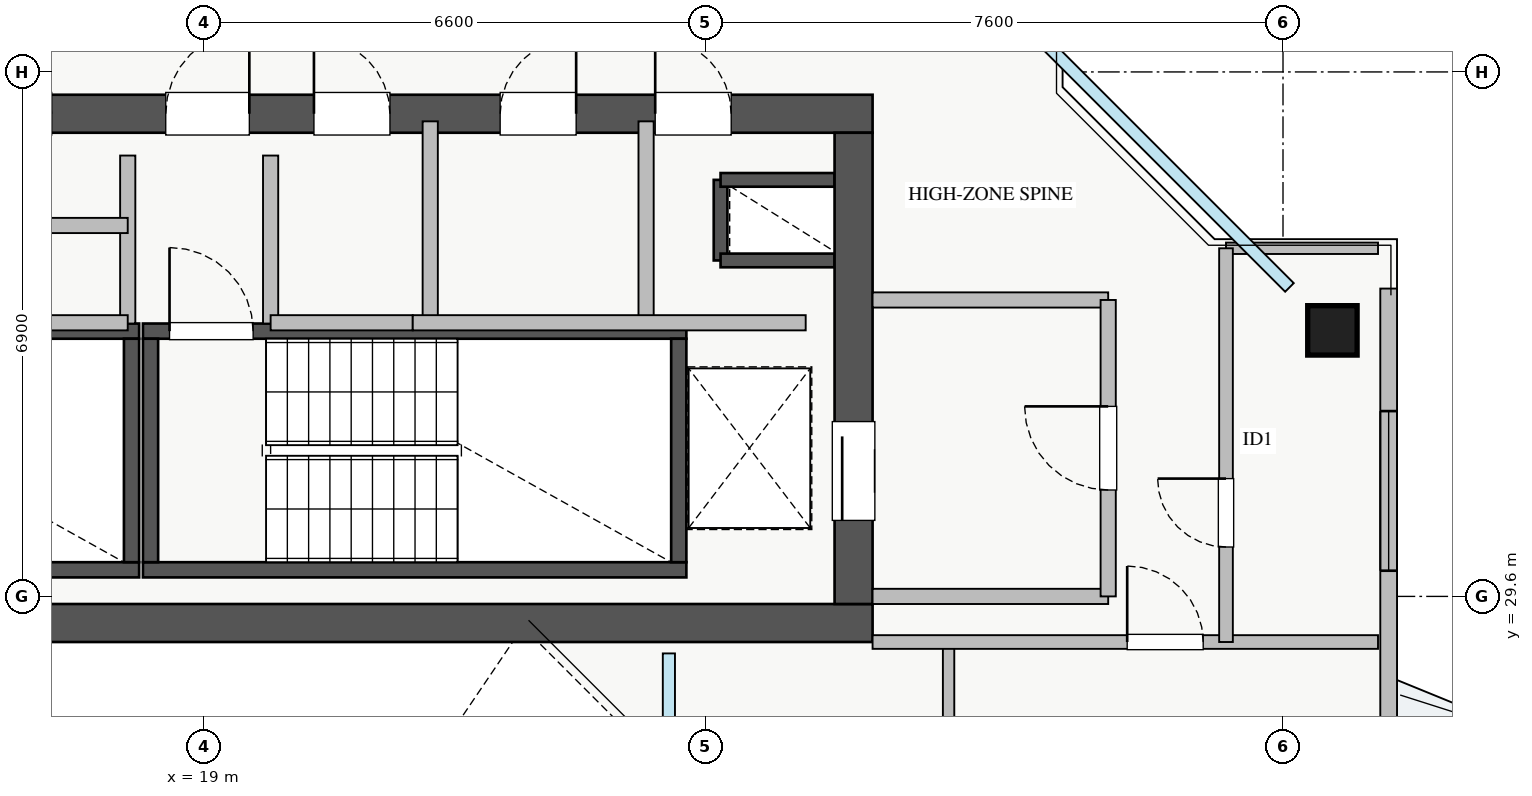
"""IFC4 building model, lengths in metres.
Left out: names, types, materials, properties, quantities, classifications, styles, units other than length and angle.
Written with IfcOpenShell. Run it as: python <this file> out.ifc"""

import sys

from ifc_helpers import new_model, si_unit, direction, frame, frame_2d, origin, origin_2d, place, context, subcontext, project, spatial, rectangle, extrude, source, transform, mapped, element, fill, save


model = new_model("IFC4")
c1 = context("Model", 3, precision=1e-05, world=origin(), true_north=direction((0.0, 1.0)))
c2 = subcontext(c1, "Body", "Model", "MODEL_VIEW")
j1 = project(units=[si_unit("LENGTHUNIT", "METRE"), si_unit("PLANEANGLEUNIT", "RADIAN")], contexts=[c1])
p1 = place(None, origin())
s1 = spatial("IfcSite", under=j1, at=p1, CompositionType="ELEMENT")
p2 = place(p1, origin())
s2 = spatial("IfcBuilding", under=s1, at=p2, CompositionType="ELEMENT")
p3 = place(p2, frame((0.0, 0.0, 240.5)))
s3 = spatial("IfcBuildingStorey", under=s2, at=p3, CompositionType="ELEMENT", Elevation=240.5)
p4 = place(p3, frame((25.8, 34.02, 0.0), z_axis=(0.0, 0.0, 1.0), x_axis=(0.0, 1.0, 0.0)))
e1 = element("IfcWall", 1, at=p4, inside=s3, PredefinedType="SHEAR", context=c2, shape_type="SweptSolid", body=[
    extrude(rectangle(XDim=1.06, YDim=0.18, at=frame_2d((0.53, 0.0))), origin(), (0.0, 0.0, 1.0), 3.07),
])
for number, where, z_axis, x_axis in (
    (2, (25.8, 35.08, 0.0), (0.0, 0.0, 1.0), (1.0, 0.0, 0.0)),
    (3, (25.8, 34.02, 0.0), (0.0, 0.0, 1.0), (1.0, 0.0, 0.0)),
):
    element("IfcWall", number, at=place(p3, frame(where, z_axis=z_axis, x_axis=x_axis)), inside=s3, PredefinedType="SHEAR", context=c2, shape_type="SweptSolid", body=[
        extrude(rectangle(XDim=1.5, YDim=0.18, at=frame_2d((0.75, 0.0))), origin(), (0.0, 0.0, 1.0), 3.07),
    ])
p5 = place(p3, frame((10.7, 29.95, 0.0), z_axis=(0.0, 0.0, 1.0), x_axis=(1.0, 0.0, 0.0)))
e4 = element("IfcWall", 4, at=p5, inside=s3, PredefinedType="SHEAR", context=c2, shape_type="SweptSolid", body=[
    extrude(rectangle(XDim=7.45, YDim=0.2, at=frame_2d((3.725, 0.0))), origin(), (0.0, 0.0, 1.0), 3.25),
])
p6 = place(p3, frame((10.7, 33.09, 0.0), z_axis=(0.0, 0.0, 1.0), x_axis=(1.0, 0.0, 0.0)))
e5 = element("IfcWall", 5, at=p6, inside=s3, PredefinedType="SHEAR", context=c2, shape_type="SweptSolid", body=[
    extrude(rectangle(XDim=7.45, YDim=0.2, at=frame_2d((3.725, 0.0))), origin(), (0.0, 0.0, 1.0), 3.25),
])
p7 = place(p6, frame((0.35, 0.0, 0.0)))
e6 = element("IfcOpeningElement", 6, at=p7, cuts=e5, PredefinedType="OPENING", context=c2, shape_type="SweptSolid", body=[
    extrude(rectangle(XDim=1.1, YDim=2.05, at=frame_2d((0.55, 1.025))), frame((0.0, 0.11, 0.0), z_axis=(0.0, -1.0, 0.0), x_axis=(1.0, 0.0, 0.0)), (0.0, 0.0, 1.0), 0.22),
])
p8 = place(p3, frame((18.05, 30.05, 0.0), z_axis=(0.0, 0.0, 1.0), x_axis=(0.0, 1.0, 0.0)))
e7 = element("IfcWall", 7, at=p8, inside=s3, PredefinedType="SHEAR", context=c2, shape_type="SweptSolid", body=[
    extrude(rectangle(XDim=2.94, YDim=0.2, at=frame_2d((1.47, 0.0))), origin(), (0.0, 0.0, 1.0), 3.25),
])
p9 = place(p3, frame((18.2, 29.95, 0.0), z_axis=(0.0, 0.0, 1.0), x_axis=(1.0, 0.0, 0.0)))
e8 = element("IfcWall", 8, at=p9, inside=s3, PredefinedType="SHEAR", context=c2, shape_type="SweptSolid", body=[
    extrude(rectangle(XDim=7.15, YDim=0.2, at=frame_2d((3.575, 0.0))), origin(), (0.0, 0.0, 1.0), 3.25),
])
p10 = place(p3, frame((18.2, 33.09, 0.0), z_axis=(0.0, 0.0, 1.0), x_axis=(1.0, 0.0, 0.0)))
e9 = element("IfcWall", 9, at=p10, inside=s3, PredefinedType="SHEAR", context=c2, shape_type="SweptSolid", body=[
    extrude(rectangle(XDim=7.15, YDim=0.2, at=frame_2d((3.575, 0.0))), origin(), (0.0, 0.0, 1.0), 3.25),
])
p11 = place(p10, frame((0.35, 0.0, 0.0)))
e10 = element("IfcOpeningElement", 10, at=p11, cuts=e9, PredefinedType="OPENING", context=c2, shape_type="SweptSolid", body=[
    extrude(rectangle(XDim=1.1, YDim=2.05, at=frame_2d((0.55, 1.025))), frame((0.0, 0.11, 0.0), z_axis=(0.0, -1.0, 0.0), x_axis=(1.0, 0.0, 0.0)), (0.0, 0.0, 1.0), 0.22),
])
for number, where, z_axis, x_axis in (
    (11, (18.3, 30.05, 0.0), (0.0, 0.0, 1.0), (0.0, 1.0, 0.0)),
    (12, (25.25, 30.05, 0.0), (0.0, 0.0, 1.0), (0.0, 1.0, 0.0)),
):
    element("IfcWall", number, at=place(p3, frame(where, z_axis=z_axis, x_axis=x_axis)), inside=s3, PredefinedType="SHEAR", context=c2, shape_type="SweptSolid", body=[
        extrude(rectangle(XDim=2.94, YDim=0.2, at=frame_2d((1.47, 0.0))), origin(), (0.0, 0.0, 1.0), 3.25),
    ])
p12 = place(p3, frame((10.2, 29.25, 0.0), z_axis=(0.0, 0.0, 1.0), x_axis=(1.0, 0.0, 0.0)))
e13 = element("IfcWall", 13, at=p12, inside=s3, PredefinedType="SHEAR", context=c2, shape_type="SweptSolid", body=[
    extrude(rectangle(XDim=17.6, YDim=0.5, at=frame_2d((8.8, 0.0))), origin(), (0.0, 0.0, 1.0), 3.25),
])
p13 = place(p3, frame((10.2, 35.95, 0.0), z_axis=(0.0, 0.0, 1.0), x_axis=(1.0, 0.0, 0.0)))
e14 = element("IfcWall", 14, at=p13, inside=s3, PredefinedType="SHEAR", context=c2, shape_type="SweptSolid", body=[
    extrude(rectangle(XDim=17.6, YDim=0.5, at=frame_2d((8.8, 0.0))), origin(), (0.0, 0.0, 1.0), 3.25),
])
p14 = place(p13, frame((1.15, 0.0, 0.0)))
e15 = element("IfcOpeningElement", 15, at=p14, cuts=e14, PredefinedType="OPENING", context=c2, shape_type="SweptSolid", body=[
    extrude(rectangle(XDim=1.1, YDim=2.05, at=frame_2d((0.55, 1.025))), frame((0.0, 0.26, 0.0), z_axis=(0.0, -1.0, 0.0), x_axis=(1.0, 0.0, 0.0)), (0.0, 0.0, 1.0), 0.52),
])
p15 = place(p13, frame((8.3, 0.0, 0.0)))
e16 = element("IfcOpeningElement", 16, at=p15, cuts=e14, PredefinedType="OPENING", context=c2, shape_type="SweptSolid", body=[
    extrude(rectangle(XDim=1.1, YDim=2.05, at=frame_2d((0.55, 1.025))), frame((0.0, 0.26, 0.0), z_axis=(0.0, -1.0, 0.0), x_axis=(1.0, 0.0, 0.0)), (0.0, 0.0, 1.0), 0.52),
])
p16 = place(p13, frame((2.85, 0.0, 0.0)))
e17 = element("IfcOpeningElement", 17, at=p16, cuts=e14, PredefinedType="OPENING", context=c2, shape_type="SweptSolid", body=[
    extrude(rectangle(XDim=1.1, YDim=2.05, at=frame_2d((0.55, 1.025))), frame((0.0, 0.26, 0.0), z_axis=(0.0, -1.0, 0.0), x_axis=(1.0, 0.0, 0.0)), (0.0, 0.0, 1.0), 0.52),
])
p17 = place(p13, frame((5.8, 0.0, 0.0)))
e18 = element("IfcOpeningElement", 18, at=p17, cuts=e14, PredefinedType="OPENING", context=c2, shape_type="SweptSolid", body=[
    extrude(rectangle(XDim=1.0, YDim=2.05, at=frame_2d((0.5, 1.025))), frame((0.0, 0.26, 0.0), z_axis=(0.0, -1.0, 0.0), x_axis=(1.0, 0.0, 0.0)), (0.0, 0.0, 1.0), 0.52),
])
p18 = place(p13, frame((14.74, 0.0, 0.0)))
e19 = element("IfcOpeningElement", 19, at=p18, cuts=e14, PredefinedType="OPENING", context=c2, shape_type="SweptSolid", body=[
    extrude(rectangle(XDim=1.0, YDim=2.05, at=frame_2d((0.5, 1.025))), frame((0.0, 0.26, 0.0), z_axis=(0.0, -1.0, 0.0), x_axis=(1.0, 0.0, 0.0)), (0.0, 0.0, 1.0), 0.52),
])
p19 = place(p13, frame((10.25, 0.0, 0.0)))
e20 = element("IfcOpeningElement", 20, at=p19, cuts=e14, PredefinedType="OPENING", context=c2, shape_type="SweptSolid", body=[
    extrude(rectangle(XDim=1.0, YDim=2.05, at=frame_2d((0.5, 1.025))), frame((0.0, 0.26, 0.0), z_axis=(0.0, -1.0, 0.0), x_axis=(1.0, 0.0, 0.0)), (0.0, 0.0, 1.0), 0.52),
])
p20 = place(p13, frame((12.7, 0.0, 0.0)))
e21 = element("IfcOpeningElement", 21, at=p20, cuts=e14, PredefinedType="OPENING", context=c2, shape_type="SweptSolid", body=[
    extrude(rectangle(XDim=1.0, YDim=2.05, at=frame_2d((0.5, 1.025))), frame((0.0, 0.26, 0.0), z_axis=(0.0, -1.0, 0.0), x_axis=(1.0, 0.0, 0.0)), (0.0, 0.0, 1.0), 0.52),
])
p21 = place(p3, frame((27.55, 29.5, 0.0), z_axis=(0.0, 0.0, 1.0), x_axis=(0.0, 1.0, 0.0)))
e22 = element("IfcWall", 22, at=p21, inside=s3, PredefinedType="SHEAR", context=c2, shape_type="SweptSolid", body=[
    extrude(rectangle(XDim=6.2, YDim=0.5, at=frame_2d((3.1, 0.0))), origin(), (0.0, 0.0, 1.0), 3.25),
])
p22 = place(p21, frame((1.1, 0.0, 0.0)))
e23 = element("IfcOpeningElement", 23, at=p22, cuts=e22, PredefinedType="OPENING", context=c2, shape_type="SweptSolid", body=[
    extrude(rectangle(XDim=1.3, YDim=2.05, at=frame_2d((0.65, 1.025))), frame((0.0, 0.26, 0.0), z_axis=(0.0, -1.0, 0.0), x_axis=(1.0, 0.0, 0.0)), (0.0, 0.0, 1.0), 0.52),
])
m1 = source(origin(), c2, "Body", "SweptSolid", [
    extrude(rectangle(XDim=0.65, YDim=0.65, at=origin_2d()), origin(), (0.0, 0.0, 1.0), 3.25),
])
p23 = place(p3, frame((33.85, 33.1, 0.0), z_axis=(0.0, 0.0, 1.0), x_axis=(1.0, 0.0, 0.0)))
e24 = element("IfcColumn", 24, at=p23, inside=s3, PredefinedType="COLUMN", context=c2, shape_type="MappedRepresentation", body=[
    mapped(m1, transform((0.0, 0.0, 0.0), x_axis=(1.0, 0.0, 0.0), y_axis=(0.0, 1.0, 0.0), z_axis=(0.0, 0.0, 1.0), scale=1.0)),
])
p24 = place(p3, frame((34.59, 12.35, 0.0), z_axis=(0.0, 0.0, 1.0), x_axis=(0.0, 1.0, 0.0)))
e25 = element("IfcWall", 25, at=p24, inside=s3, PredefinedType="STANDARD", context=c2, shape_type="SweptSolid", body=[
    extrude(rectangle(XDim=21.3, YDim=0.22, at=frame_2d((10.65, 0.0))), origin(), (0.0, 0.0, 1.0), 2.61),
])
p25 = place(p24, frame((11.5, 0.0, 0.0)))
e26 = element("IfcOpeningElement", 26, at=p25, cuts=e25, PredefinedType="OPENING", context=c2, shape_type="SweptSolid", body=[
    extrude(rectangle(XDim=1.2, YDim=2.1, at=frame_2d((0.6, 1.05))), frame((0.0, 0.12, 0.0), z_axis=(0.0, -1.0, 0.0), x_axis=(1.0, 0.0, 0.0)), (0.0, 0.0, 1.0), 0.24),
])
p26 = place(p24, frame((1.463, 0.0, 0.9)))
e27 = element("IfcOpeningElement", 27, at=p26, cuts=e25, PredefinedType="OPENING", context=c2, shape_type="SweptSolid", body=[
    extrude(rectangle(XDim=2.4, YDim=1.48, at=frame_2d((1.2, 0.74))), frame((0.0, 0.12, 0.0), z_axis=(0.0, -1.0, 0.0), x_axis=(1.0, 0.0, 0.0)), (0.0, 0.0, 1.0), 0.24),
])
p27 = place(p24, frame((17.588, 0.0, 0.9)))
e28 = element("IfcOpeningElement", 28, at=p27, cuts=e25, PredefinedType="OPENING", context=c2, shape_type="SweptSolid", body=[
    extrude(rectangle(XDim=2.1, YDim=1.48, at=frame_2d((1.05, 0.74))), frame((0.0, 0.12, 0.0), z_axis=(0.0, -1.0, 0.0), x_axis=(1.0, 0.0, 0.0)), (0.0, 0.0, 1.0), 0.24),
])
for number, where, z_axis, x_axis in (
    (29, (27.8, 29.6, 0.0), (0.0, 0.0, 1.0), (1.0, 0.0, 0.0)),
    (30, (27.8, 33.5, 0.0), (0.0, 0.0, 1.0), (1.0, 0.0, 0.0)),
):
    element("IfcWall", number, at=place(p3, frame(where, z_axis=z_axis, x_axis=x_axis)), inside=s3, PredefinedType="PARTITIONING", context=c2, shape_type="SweptSolid", body=[
        extrude(rectangle(XDim=3.1, YDim=0.2, at=frame_2d((1.55, 0.0))), origin(), (0.0, 0.0, 1.0), 3.07),
    ])
p28 = place(p3, frame((30.9, 29.6, 0.0), z_axis=(0.0, 0.0, 1.0), x_axis=(0.0, 1.0, 0.0)))
e31 = element("IfcWall", 31, at=p28, inside=s3, PredefinedType="PARTITIONING", context=c2, shape_type="SweptSolid", body=[
    extrude(rectangle(XDim=3.9, YDim=0.2, at=frame_2d((1.95, 0.0))), origin(), (0.0, 0.0, 1.0), 2.821),
])
p29 = place(p28, frame((1.4, 0.0, 0.0)))
e32 = element("IfcOpeningElement", 32, at=p29, cuts=e31, PredefinedType="OPENING", context=c2, shape_type="SweptSolid", body=[
    extrude(rectangle(XDim=1.1, YDim=2.05, at=frame_2d((0.55, 1.025))), frame((0.0, 0.11, 0.0), z_axis=(0.0, -1.0, 0.0), x_axis=(1.0, 0.0, 0.0)), (0.0, 0.0, 1.0), 0.22),
])
for number, where, z_axis, x_axis in (
    (33, (18.0, 33.19, 0.0), (0.0, 0.0, 1.0), (0.0, 1.0, 0.0)),
    (34, (19.88, 33.19, 0.0), (0.0, 0.0, 1.0), (0.0, 1.0, 0.0)),
):
    element("IfcWall", number, at=place(p3, frame(where, z_axis=z_axis, x_axis=x_axis)), inside=s3, PredefinedType="PARTITIONING", context=c2, shape_type="SweptSolid", body=[
        extrude(rectangle(XDim=2.21, YDim=0.2, at=frame_2d((1.105, 0.0))), origin(), (0.0, 0.0, 1.0), 3.07),
    ])
p30 = place(p3, frame((14.72, 34.48, 0.0), z_axis=(0.0, 0.0, 1.0), x_axis=(1.0, 0.0, 0.0)))
e35 = element("IfcWall", 35, at=p30, inside=s3, PredefinedType="PARTITIONING", context=c2, shape_type="SweptSolid", body=[
    extrude(rectangle(XDim=3.28, YDim=0.2, at=frame_2d((1.64, 0.0))), origin(), (0.0, 0.0, 1.0), 3.07),
])
p31 = place(p30, frame((1.15, 0.0, 0.0)))
e36 = element("IfcOpeningElement", 36, at=p31, cuts=e35, PredefinedType="OPENING", context=c2, shape_type="SweptSolid", body=[
    extrude(rectangle(XDim=0.9, YDim=2.05, at=frame_2d((0.45, 1.025))), frame((0.0, 0.11, 0.0), z_axis=(0.0, -1.0, 0.0), x_axis=(1.0, 0.0, 0.0)), (0.0, 0.0, 1.0), 0.22),
])
p32 = place(p3, frame((14.72, 33.2, 0.0), z_axis=(0.0, 0.0, 1.0), x_axis=(1.0, 0.0, 0.0)))
e37 = element("IfcWall", 37, at=p32, inside=s3, PredefinedType="PARTITIONING", context=c2, shape_type="SweptSolid", body=[
    extrude(rectangle(XDim=3.28, YDim=0.2, at=frame_2d((1.64, 0.0))), origin(), (0.0, 0.0, 1.0), 3.07),
])
p33 = place(p3, frame((24.82, 33.2, 0.0), z_axis=(0.0, 0.0, 1.0), x_axis=(0.0, 1.0, 0.0)))
e38 = element("IfcWall", 38, at=p33, inside=s3, PredefinedType="PARTITIONING", context=c2, shape_type="SweptSolid", body=[
    extrude(rectangle(XDim=2.65, YDim=0.2, at=frame_2d((1.325, 0.0))), origin(), (0.0, 0.0, 1.0), 3.07),
])
p34 = place(p3, frame((19.88, 33.2, 0.0), z_axis=(0.0, 0.0, 1.0), x_axis=(1.0, 0.0, 0.0)))
e39 = element("IfcWall", 39, at=p34, inside=s3, PredefinedType="PARTITIONING", context=c2, shape_type="SweptSolid", body=[
    extrude(rectangle(XDim=1.87, YDim=0.2, at=frame_2d((0.935, 0.0))), origin(), (0.0, 0.0, 1.0), 3.07),
])
p35 = place(p3, frame((21.98, 33.2, 0.0), z_axis=(0.0, 0.0, 1.0), x_axis=(0.0, 1.0, 0.0)))
e40 = element("IfcWall", 40, at=p35, inside=s3, PredefinedType="PARTITIONING", context=c2, shape_type="SweptSolid", body=[
    extrude(rectangle(XDim=2.65, YDim=0.2, at=frame_2d((1.325, 0.0))), origin(), (0.0, 0.0, 1.0), 3.07),
])
p36 = place(p3, frame((21.75, 33.2, 0.0), z_axis=(0.0, 0.0, 1.0), x_axis=(1.0, 0.0, 0.0)))
e41 = element("IfcWall", 41, at=p36, inside=s3, PredefinedType="PARTITIONING", context=c2, shape_type="SweptSolid", body=[
    extrude(rectangle(XDim=5.17, YDim=0.2, at=frame_2d((2.585, 0.0))), origin(), (0.0, 0.0, 1.0), 3.07),
])
p37 = place(p3, frame((28.8, 23.0, 0.0), z_axis=(0.0, 0.0, 1.0), x_axis=(0.0, 1.0, 0.0)))
e42 = element("IfcWall", 42, at=p37, inside=s3, PredefinedType="PARTITIONING", context=c2, shape_type="SweptSolid", body=[
    extrude(rectangle(XDim=6.0, YDim=0.15, at=frame_2d((3.0, 0.0))), origin(), (0.0, 0.0, 1.0), 3.07),
])
p38 = place(p37, frame((2.2, 0.0, 0.0)))
e43 = element("IfcOpeningElement", 43, at=p38, cuts=e42, PredefinedType="OPENING", context=c2, shape_type="SweptSolid", body=[
    extrude(rectangle(XDim=0.9, YDim=2.05, at=frame_2d((0.45, 1.025))), frame((0.0, 0.085, 0.0), z_axis=(0.0, -1.0, 0.0), x_axis=(1.0, 0.0, 0.0)), (0.0, 0.0, 1.0), 0.17),
])
p39 = place(p3, frame((27.8, 29.0, 0.0), z_axis=(0.0, 0.0, 1.0), x_axis=(1.0, 0.0, 0.0)))
e44 = element("IfcWall", 44, at=p39, inside=s3, PredefinedType="PARTITIONING", context=c2, shape_type="SweptSolid", body=[
    extrude(rectangle(XDim=6.65, YDim=0.18, at=frame_2d((3.325, 0.0))), origin(), (0.0, 0.0, 1.0), 3.07),
])
p40 = place(p39, frame((3.35, 0.0, 0.0)))
e45 = element("IfcOpeningElement", 45, at=p40, cuts=e44, PredefinedType="OPENING", context=c2, shape_type="SweptSolid", body=[
    extrude(rectangle(XDim=1.0, YDim=2.05, at=frame_2d((0.5, 1.025))), frame((0.0, 0.1, 0.0), z_axis=(0.0, -1.0, 0.0), x_axis=(1.0, 0.0, 0.0)), (0.0, 0.0, 1.0), 0.2),
])
p41 = place(p3, frame((32.45, 34.18, 0.0), z_axis=(0.0, 0.0, 1.0), x_axis=(1.0, 0.0, 0.0)))
e46 = element("IfcWall", 46, at=p41, inside=s3, PredefinedType="PARTITIONING", context=c2, shape_type="SweptSolid", body=[
    extrude(rectangle(XDim=2.0, YDim=0.15, at=frame_2d((1.0, 0.0))), origin(), (0.0, 0.0, 1.0), 3.07),
])
p42 = place(p3, frame((32.45, 29.0, 0.0), z_axis=(0.0, 0.0, 1.0), x_axis=(0.0, 1.0, 0.0)))
e47 = element("IfcWall", 47, at=p42, inside=s3, PredefinedType="PARTITIONING", context=c2, shape_type="SweptSolid", body=[
    extrude(rectangle(XDim=5.18, YDim=0.18, at=frame_2d((2.59, 0.0))), origin(), (0.0, 0.0, 1.0), 3.07),
])
p43 = place(p42, frame((1.25, 0.0, 0.0)))
e48 = element("IfcOpeningElement", 48, at=p43, cuts=e47, PredefinedType="OPENING", context=c2, shape_type="SweptSolid", body=[
    extrude(rectangle(XDim=0.9, YDim=2.05, at=frame_2d((0.45, 1.025))), frame((0.0, 0.1, 0.0), z_axis=(0.0, -1.0, 0.0), x_axis=(1.0, 0.0, 0.0)), (0.0, 0.0, 1.0), 0.2),
])
m2 = source(origin(), c2, "Body", "SweptSolid", [
    extrude(rectangle(XDim=2.1, YDim=1.48, at=frame_2d((1.05, 0.74))), frame((0.0, 0.03, 0.0), z_axis=(0.0, -1.0, 0.0), x_axis=(1.0, 0.0, 0.0)), (0.0, 0.0, 1.0), 0.06),
])
p44 = place(p27, origin())
e49 = element("IfcWindow", 49, at=p44, inside=s3, PartitioningType="TRIPLE_PANEL_VERTICAL", PredefinedType="WINDOW", context=c2, shape_type="MappedRepresentation", body=[
    mapped(m2, transform((0.0, 0.0, 0.0), x_axis=(1.0, 0.0, 0.0), y_axis=(0.0, 1.0, 0.0), z_axis=(0.0, 0.0, 1.0), scale=1.0)),
])
fill(e28, e49)
m3 = source(origin(), c2, "Body", "SweptSolid", [
    extrude(rectangle(XDim=1.3, YDim=2.05, at=frame_2d((0.65, 1.025))), frame((0.0, 0.025, 0.0), z_axis=(0.0, -1.0, 0.0), x_axis=(1.0, 0.0, 0.0)), (0.0, 0.0, 1.0), 0.05),
])
p45 = place(p22, origin())
e50 = element("IfcDoor", 50, at=p45, inside=s3, OperationType="SLIDING_TO_LEFT", PredefinedType="DOOR", context=c2, shape_type="MappedRepresentation", body=[
    mapped(m3, transform((0.0, 0.0, 0.0), x_axis=(1.0, 0.0, 0.0), y_axis=(0.0, 1.0, 0.0), z_axis=(0.0, 0.0, 1.0), scale=1.0)),
])
fill(e23, e50)
m4 = source(origin(), c2, "Body", "SweptSolid", [
    extrude(rectangle(XDim=1.1, YDim=2.05, at=frame_2d((0.55, 1.025))), frame((0.0, 0.025, 0.0), z_axis=(0.0, -1.0, 0.0), x_axis=(1.0, 0.0, 0.0)), (0.0, 0.0, 1.0), 0.05),
])
p46 = place(p15, origin())
e51 = element("IfcDoor", 51, at=p46, inside=s3, OperationType="SINGLE_SWING_RIGHT", PredefinedType="DOOR", context=c2, shape_type="MappedRepresentation", body=[
    mapped(m4, transform((0.0, 0.0, 0.0), x_axis=(1.0, 0.0, 0.0), y_axis=(0.0, 1.0, 0.0), z_axis=(0.0, 0.0, 1.0), scale=1.0)),
])
fill(e16, e51)
p47 = place(p11, origin())
e52 = element("IfcDoor", 52, at=p47, inside=s3, OperationType="SINGLE_SWING_LEFT", PredefinedType="DOOR", context=c2, shape_type="MappedRepresentation", body=[
    mapped(m4, transform((0.0, 0.0, 0.0), x_axis=(1.0, 0.0, 0.0), y_axis=(0.0, 1.0, 0.0), z_axis=(0.0, 0.0, 1.0), scale=1.0)),
])
fill(e10, e52)
m5 = source(origin(), c2, "Body", "SweptSolid", [
    extrude(rectangle(XDim=1.0, YDim=2.05, at=frame_2d((0.5, 1.025))), frame((0.0, 0.025, 0.0), z_axis=(0.0, -1.0, 0.0), x_axis=(1.0, 0.0, 0.0)), (0.0, 0.0, 1.0), 0.05),
])
p48 = place(p18, origin())
e53 = element("IfcDoor", 53, at=p48, inside=s3, OperationType="SINGLE_SWING_LEFT", PredefinedType="DOOR", context=c2, shape_type="MappedRepresentation", body=[
    mapped(m5, transform((0.0, 0.0, 0.0), x_axis=(1.0, 0.0, 0.0), y_axis=(0.0, 1.0, 0.0), z_axis=(0.0, 0.0, 1.0), scale=1.0)),
])
fill(e19, e53)
p49 = place(p19, origin())
e54 = element("IfcDoor", 54, at=p49, inside=s3, OperationType="SINGLE_SWING_LEFT", PredefinedType="DOOR", context=c2, shape_type="MappedRepresentation", body=[
    mapped(m5, transform((0.0, 0.0, 0.0), x_axis=(1.0, 0.0, 0.0), y_axis=(0.0, 1.0, 0.0), z_axis=(0.0, 0.0, 1.0), scale=1.0)),
])
fill(e20, e54)
p50 = place(p20, origin())
e55 = element("IfcDoor", 55, at=p50, inside=s3, OperationType="SINGLE_SWING_RIGHT", PredefinedType="DOOR", context=c2, shape_type="MappedRepresentation", body=[
    mapped(m5, transform((0.0, 0.0, 0.0), x_axis=(1.0, 0.0, 0.0), y_axis=(0.0, 1.0, 0.0), z_axis=(0.0, 0.0, 1.0), scale=1.0)),
])
fill(e21, e55)
p51 = place(p29, origin())
e56 = element("IfcDoor", 56, at=p51, inside=s3, OperationType="SINGLE_SWING_RIGHT", PredefinedType="DOOR", context=c2, shape_type="MappedRepresentation", body=[
    mapped(m4, transform((0.0, 0.0, 0.0), x_axis=(1.0, 0.0, 0.0), y_axis=(0.0, 1.0, 0.0), z_axis=(0.0, 0.0, 1.0), scale=1.0)),
])
fill(e32, e56)
p52 = place(p40, origin())
e57 = element("IfcDoor", 57, at=p52, inside=s3, OperationType="SINGLE_SWING_LEFT", PredefinedType="DOOR", context=c2, shape_type="MappedRepresentation", body=[
    mapped(m5, transform((0.0, 0.0, 0.0), x_axis=(1.0, 0.0, 0.0), y_axis=(0.0, 1.0, 0.0), z_axis=(0.0, 0.0, 1.0), scale=1.0)),
])
fill(e45, e57)
m6 = source(origin(), c2, "Body", "SweptSolid", [
    extrude(rectangle(XDim=0.9, YDim=2.05, at=frame_2d((0.45, 1.025))), frame((0.0, 0.025, 0.0), z_axis=(0.0, -1.0, 0.0), x_axis=(1.0, 0.0, 0.0)), (0.0, 0.0, 1.0), 0.05),
])
p53 = place(p43, origin())
e58 = element("IfcDoor", 58, at=p53, inside=s3, OperationType="SINGLE_SWING_RIGHT", PredefinedType="DOOR", context=c2, shape_type="MappedRepresentation", body=[
    mapped(m6, transform((0.0, 0.0, 0.0), x_axis=(1.0, 0.0, 0.0), y_axis=(0.0, 1.0, 0.0), z_axis=(0.0, 0.0, 1.0), scale=1.0)),
])
fill(e48, e58)
save(model, sys.argv[1])
